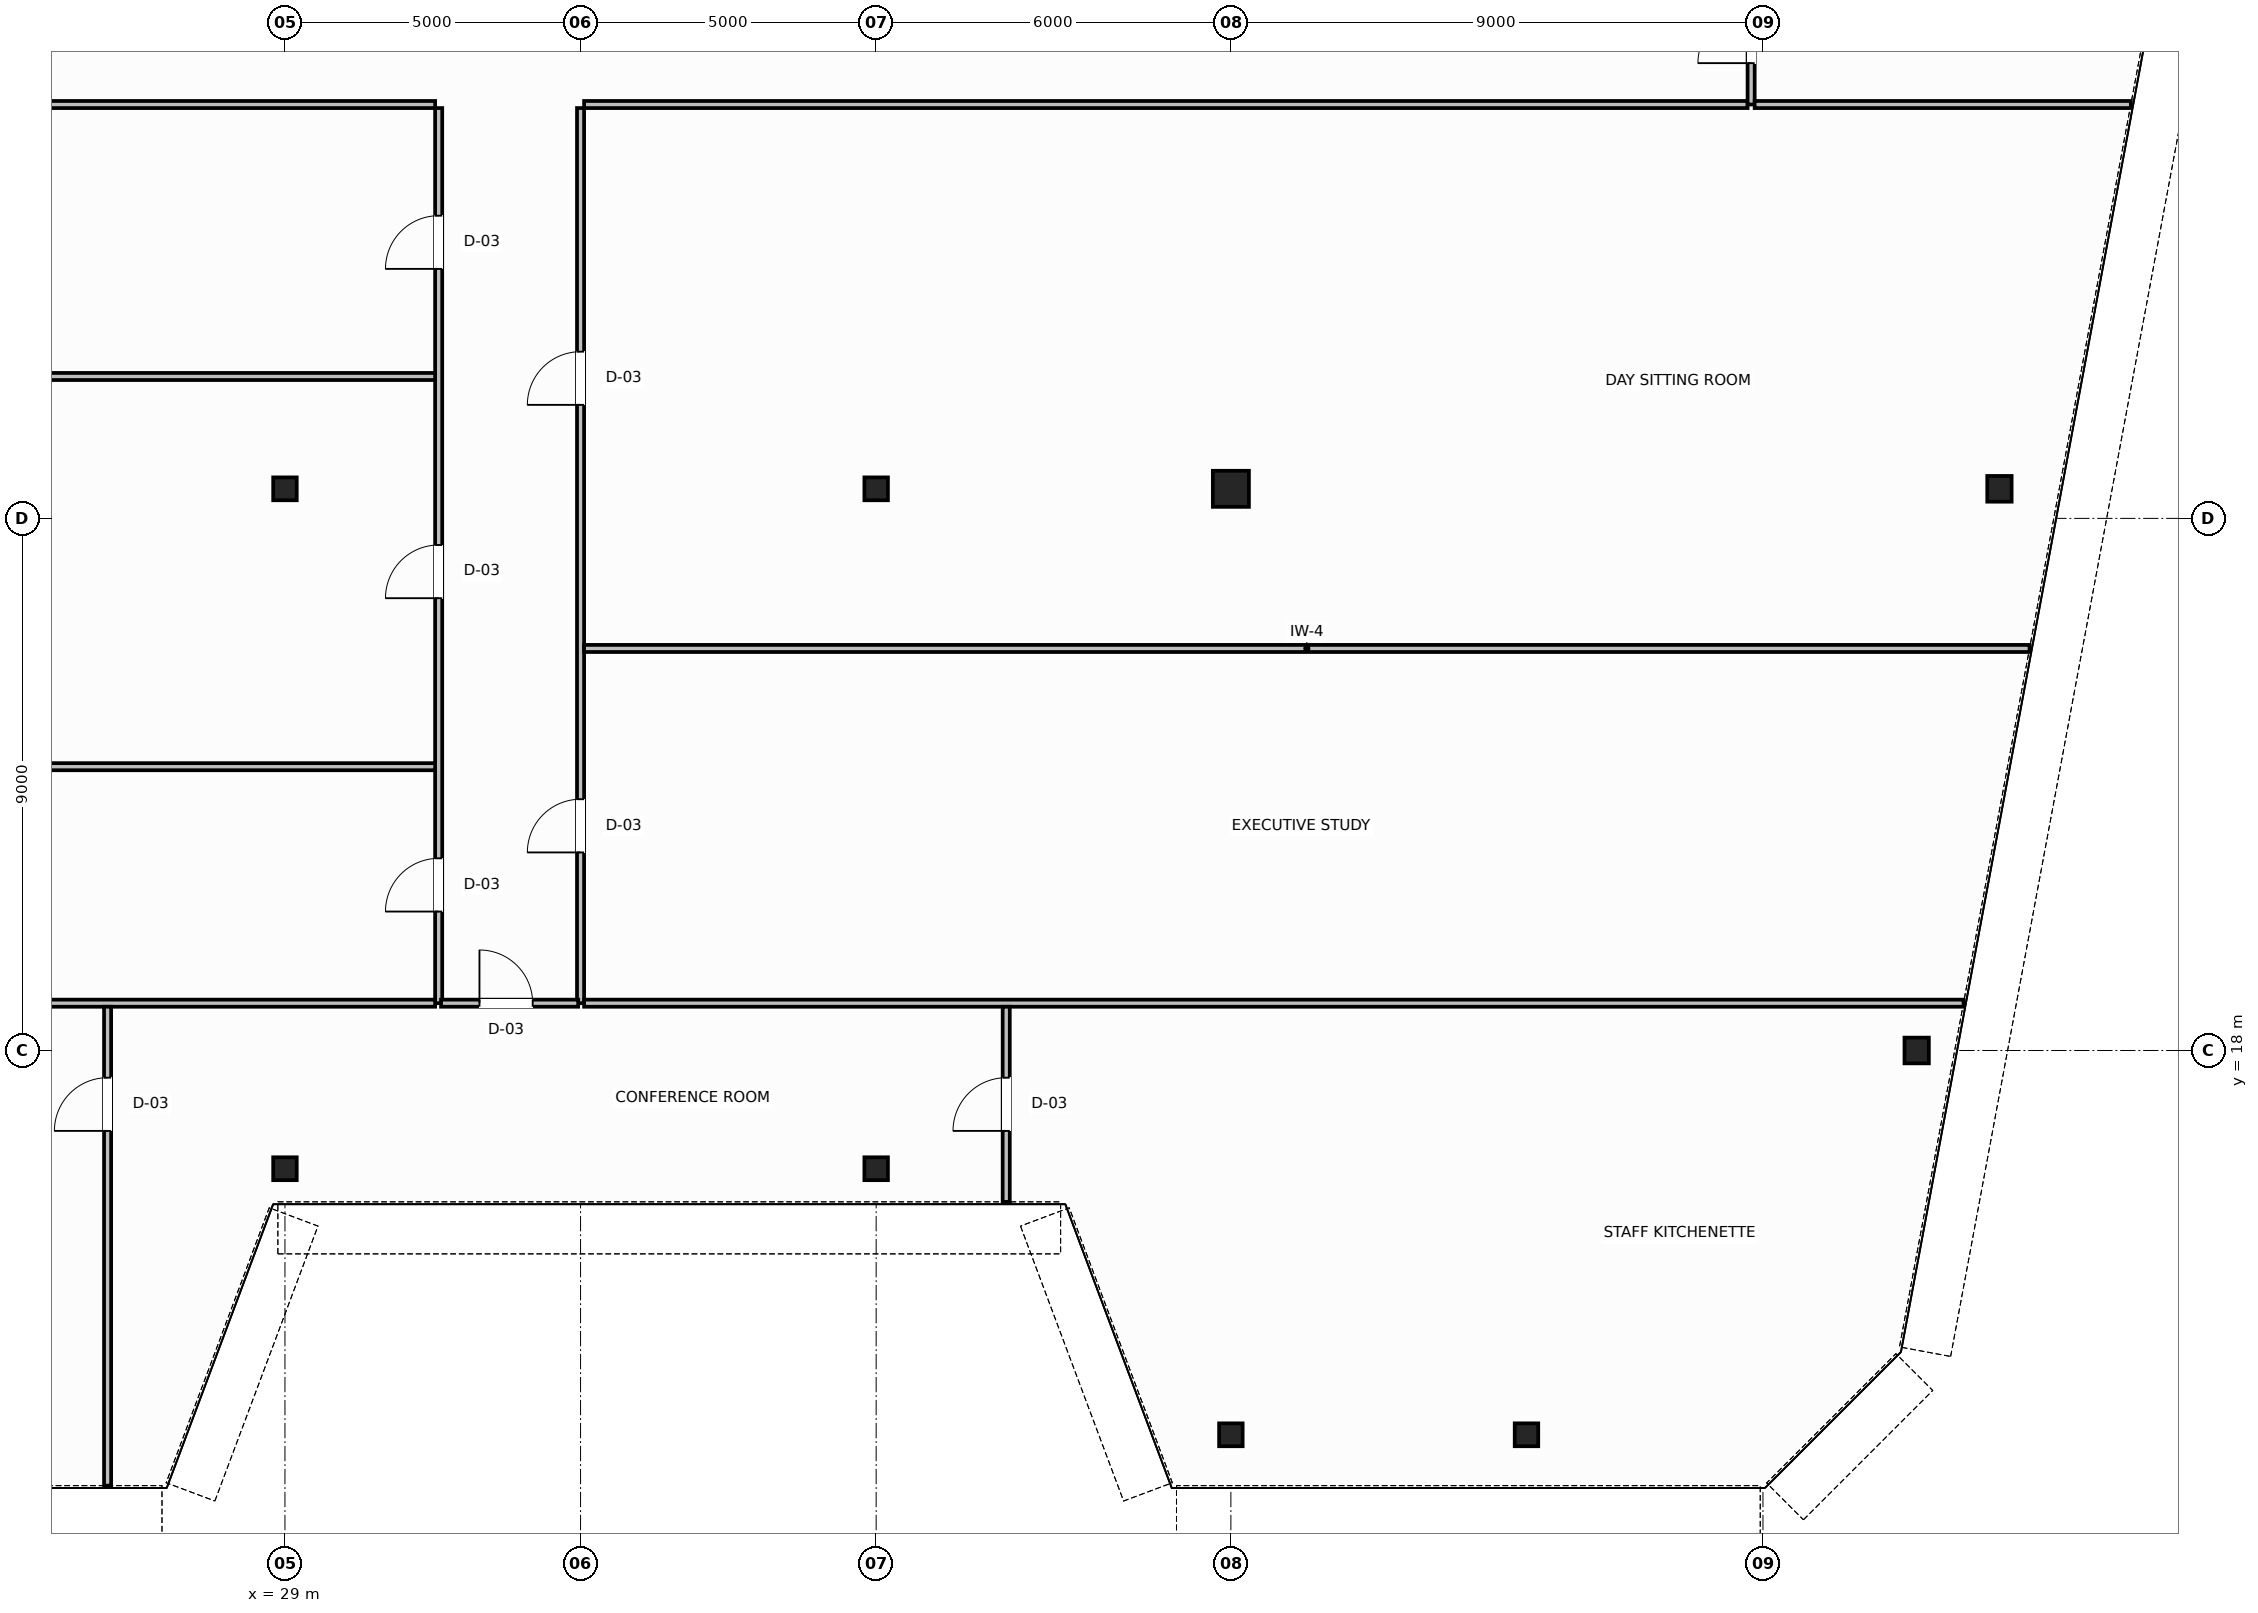
"""IFC4 building model, lengths in metres.
Left out: names, types, materials, properties, quantities, classifications, styles, units other than length and angle.
Written with IfcOpenShell. Run it as: python <this file> out.ifc"""

import sys

from ifc_helpers import new_model, si_unit, direction, frame, frame_2d, origin, origin_2d, place, context, subcontext, project, spatial, rectangle, hollow_circle, i_section, extrude, source, transform, mapped, element, fill, save


model = new_model("IFC4")
c1 = context("Model", 3, precision=1e-05, world=origin(), true_north=direction((0.0, 1.0)))
c2 = subcontext(c1, "Body", "Model", "MODEL_VIEW")
j1 = project(units=[si_unit("LENGTHUNIT", "METRE"), si_unit("PLANEANGLEUNIT", "RADIAN")], contexts=[c1])
p1 = place(None, origin())
s1 = spatial("IfcSite", under=j1, at=p1, CompositionType="ELEMENT")
p2 = place(p1, origin())
s2 = spatial("IfcBuilding", under=s1, at=p2, CompositionType="ELEMENT")
p3 = place(p2, frame((0.0, 0.0, 242.2)))
s3 = spatial("IfcBuildingStorey", under=s2, at=p3, CompositionType="ELEMENT", Elevation=242.2)
m1 = source(origin(), c2, "Body", "SweptSolid", [
    extrude(i_section(OverallWidth=0.412, OverallDepth=0.435, WebThickness=0.036, FlangeThickness=0.05, FilletRadius=0.015, at=origin_2d()), origin(), (0.0, 0.0, 1.0), 3.8),
])
for number, where, z_axis, x_axis in (
    (1, (58.0, 27.5, 0.0), (0.0, 0.0, 1.0), (1.0, 0.0, 0.0)),
    (2, (56.6, 18.0, 0.0), (0.0, 0.0, 1.0), (1.0, 0.0, 0.0)),
):
    element("IfcColumn", number, at=place(p3, frame(where, z_axis=z_axis, x_axis=x_axis)), inside=s3, PredefinedType="COLUMN", context=c2, shape_type="MappedRepresentation", body=[
        mapped(m1, transform((0.0, 0.0, 0.0), scale=1.0)),
    ])
m2 = source(origin(), c2, "Body", "SweptSolid", [
    extrude(i_section(OverallWidth=0.398, OverallDepth=0.387, WebThickness=0.021, FlangeThickness=0.029, FilletRadius=0.015, at=origin_2d()), origin(), (0.0, 0.0, 1.0), 3.8),
])
for number, where, z_axis, x_axis in (
    (3, (29.0, 27.5, 0.0), (0.0, 0.0, 1.0), (1.0, 0.0, 0.0)),
    (4, (39.0, 27.5, 0.0), (0.0, 0.0, 1.0), (1.0, 0.0, 0.0)),
):
    element("IfcColumn", number, at=place(p3, frame(where, z_axis=z_axis, x_axis=x_axis)), inside=s3, PredefinedType="COLUMN", context=c2, shape_type="MappedRepresentation", body=[
        mapped(m2, transform((0.0, 0.0, 0.0), scale=1.0)),
    ])
m3 = source(origin(), c2, "Body", "SweptSolid", [
    extrude(hollow_circle(Radius=0.305, WallThickness=0.03, at=origin_2d()), origin(), (0.0, 0.0, 1.0), 3.8),
])
p4 = place(p3, frame((45.0, 27.5, 0.0), z_axis=(0.0, 0.0, 1.0), x_axis=(1.0, 0.0, 0.0)))
e5 = element("IfcColumn", 5, at=p4, inside=s3, PredefinedType="COLUMN", context=c2, shape_type="MappedRepresentation", body=[
    mapped(m3, transform((0.0, 0.0, 0.0), scale=1.0)),
])
for number, where, z_axis, x_axis in (
    (6, (29.0, 16.0, 0.0), (0.0, 0.0, 1.0), (1.0, 0.0, 0.0)),
    (7, (39.0, 16.0, 0.0), (0.0, 0.0, 1.0), (1.0, 0.0, 0.0)),
    (8, (45.0, 11.5, 0.0), (0.0, 0.0, 1.0), (1.0, 0.0, 0.0)),
    (9, (50.0, 11.5, 0.0), (0.0, 0.0, 1.0), (1.0, 0.0, 0.0)),
):
    element("IfcColumn", number, at=place(p3, frame(where, z_axis=z_axis, x_axis=x_axis)), inside=s3, PredefinedType="COLUMN", context=c2, shape_type="MappedRepresentation", body=[
        mapped(m2, transform((0.0, 0.0, 0.0), scale=1.0)),
    ])
p5 = place(p3, frame((14.26, 34.0, 0.0), z_axis=(0.0, 0.0, 1.0), x_axis=(1.0, 0.0, 0.0)))
e10 = element("IfcWall", 10, at=p5, inside=s3, PredefinedType="PARTITIONING", context=c2, shape_type="SweptSolid", body=[
    extrude(rectangle(XDim=17.28, YDim=0.12, at=frame_2d((8.64, 0.0))), origin(), (0.0, 0.0, 1.0), 3.58),
])
p6 = place(p3, frame((34.06, 34.0, 0.0), z_axis=(0.0, 0.0, 1.0), x_axis=(1.0, 0.0, 0.0)))
e11 = element("IfcWall", 11, at=p6, inside=s3, PredefinedType="PARTITIONING", context=c2, shape_type="SweptSolid", body=[
    extrude(rectangle(XDim=19.68, YDim=0.12, at=frame_2d((9.84, 0.0))), origin(), (0.0, 0.0, 1.0), 3.58),
])
p7 = place(p3, frame((53.8, 34.0, 0.0), z_axis=(0.0, 0.0, 1.0), x_axis=(0.0, 1.0, 0.0)))
e12 = element("IfcWall", 12, at=p7, inside=s3, PredefinedType="PARTITIONING", context=c2, shape_type="SweptSolid", body=[
    extrude(rectangle(XDim=2.44, YDim=0.12, at=frame_2d((1.22, 0.0))), origin(), (0.0, 0.0, 1.0), 3.58),
])
p8 = place(p7, frame((0.7, 0.0, 0.0)))
e13 = element("IfcOpeningElement", 13, at=p8, cuts=e12, PredefinedType="OPENING", context=c2, shape_type="SweptSolid", body=[
    extrude(rectangle(XDim=0.9, YDim=2.15, at=frame_2d((0.45, 1.075))), frame((0.0, 0.07, 0.0), z_axis=(0.0, -1.0, 0.0), x_axis=(1.0, 0.0, 0.0)), (0.0, 0.0, 1.0), 0.14),
])
p9 = place(p3, frame((31.6, 18.8, 0.0), z_axis=(0.0, 0.0, 1.0), x_axis=(0.0, 1.0, 0.0)))
e14 = element("IfcWall", 14, at=p9, inside=s3, PredefinedType="PARTITIONING", context=c2, shape_type="SweptSolid", body=[
    extrude(rectangle(XDim=15.14, YDim=0.12, at=frame_2d((7.57, 0.0))), origin(), (0.0, 0.0, 1.0), 3.58),
])
p10 = place(p9, frame((1.55, 0.0, 0.0)))
e15 = element("IfcOpeningElement", 15, at=p10, cuts=e14, PredefinedType="OPENING", context=c2, shape_type="SweptSolid", body=[
    extrude(rectangle(XDim=0.9, YDim=2.15, at=frame_2d((0.45, 1.075))), frame((0.0, 0.07, 0.0), z_axis=(0.0, -1.0, 0.0), x_axis=(1.0, 0.0, 0.0)), (0.0, 0.0, 1.0), 0.14),
])
p11 = place(p9, frame((6.85, 0.0, 0.0)))
e16 = element("IfcOpeningElement", 16, at=p11, cuts=e14, PredefinedType="OPENING", context=c2, shape_type="SweptSolid", body=[
    extrude(rectangle(XDim=0.9, YDim=2.15, at=frame_2d((0.45, 1.075))), frame((0.0, 0.07, 0.0), z_axis=(0.0, -1.0, 0.0), x_axis=(1.0, 0.0, 0.0)), (0.0, 0.0, 1.0), 0.14),
])
p12 = place(p9, frame((12.42, 0.0, 0.0)))
e17 = element("IfcOpeningElement", 17, at=p12, cuts=e14, PredefinedType="OPENING", context=c2, shape_type="SweptSolid", body=[
    extrude(rectangle(XDim=0.9, YDim=2.15, at=frame_2d((0.45, 1.075))), frame((0.0, 0.07, 0.0), z_axis=(0.0, -1.0, 0.0), x_axis=(1.0, 0.0, 0.0)), (0.0, 0.0, 1.0), 0.14),
])
p13 = place(p3, frame((34.0, 18.8, 0.0), z_axis=(0.0, 0.0, 1.0), x_axis=(0.0, 1.0, 0.0)))
e18 = element("IfcWall", 18, at=p13, inside=s3, PredefinedType="PARTITIONING", context=c2, shape_type="SweptSolid", body=[
    extrude(rectangle(XDim=15.14, YDim=0.12, at=frame_2d((7.57, 0.0))), origin(), (0.0, 0.0, 1.0), 3.58),
])
p14 = place(p13, frame((2.55, 0.0, 0.0)))
e19 = element("IfcOpeningElement", 19, at=p14, cuts=e18, PredefinedType="OPENING", context=c2, shape_type="SweptSolid", body=[
    extrude(rectangle(XDim=0.9, YDim=2.15, at=frame_2d((0.45, 1.075))), frame((0.0, 0.07, 0.0), z_axis=(0.0, -1.0, 0.0), x_axis=(1.0, 0.0, 0.0)), (0.0, 0.0, 1.0), 0.14),
])
p15 = place(p13, frame((10.12, 0.0, 0.0)))
e20 = element("IfcOpeningElement", 20, at=p15, cuts=e18, PredefinedType="OPENING", context=c2, shape_type="SweptSolid", body=[
    extrude(rectangle(XDim=0.9, YDim=2.15, at=frame_2d((0.45, 1.075))), frame((0.0, 0.07, 0.0), z_axis=(0.0, -1.0, 0.0), x_axis=(1.0, 0.0, 0.0)), (0.0, 0.0, 1.0), 0.14),
])
p16 = place(p3, frame((31.64, 18.8, 0.0), z_axis=(0.0, 0.0, 1.0), x_axis=(1.0, 0.0, 0.0)))
e21 = element("IfcWall", 21, at=p16, inside=s3, PredefinedType="PARTITIONING", context=c2, shape_type="SweptSolid", body=[
    extrude(rectangle(XDim=2.32, YDim=0.12, at=frame_2d((1.16, 0.0))), origin(), (0.0, 0.0, 1.0), 3.58),
])
p17 = place(p16, frame((0.65, 0.0, 0.0)))
e22 = element("IfcOpeningElement", 22, at=p17, cuts=e21, PredefinedType="OPENING", context=c2, shape_type="SweptSolid", body=[
    extrude(rectangle(XDim=0.9, YDim=2.15, at=frame_2d((0.45, 1.075))), frame((0.0, 0.07, 0.0), z_axis=(0.0, -1.0, 0.0), x_axis=(1.0, 0.0, 0.0)), (0.0, 0.0, 1.0), 0.14),
])
p18 = place(p3, frame((53.86, 34.0, 0.0), z_axis=(0.0, 0.0, 1.0), x_axis=(1.0, 0.0, 0.0)))
e23 = element("IfcWall", 23, at=p18, inside=s3, PredefinedType="PARTITIONING", context=c2, shape_type="SweptSolid", body=[
    extrude(rectangle(XDim=6.363, YDim=0.12, at=frame_2d((3.181, 0.0))), origin(), (0.0, 0.0, 1.0), 3.58),
])
p19 = place(p3, frame((9.863, 22.8, 0.0), z_axis=(0.0, 0.0, 1.0), x_axis=(1.0, 0.0, 0.0)))
e24 = element("IfcWall", 24, at=p19, inside=s3, PredefinedType="PARTITIONING", context=c2, shape_type="SweptSolid", body=[
    extrude(rectangle(XDim=21.677, YDim=0.12, at=frame_2d((10.839, 0.0))), origin(), (0.0, 0.0, 1.0), 3.58),
])
p20 = place(p3, frame((8.634, 29.4, 0.0), z_axis=(0.0, 0.0, 1.0), x_axis=(1.0, 0.0, 0.0)))
e25 = element("IfcWall", 25, at=p20, inside=s3, PredefinedType="PARTITIONING", context=c2, shape_type="SweptSolid", body=[
    extrude(rectangle(XDim=22.906, YDim=0.12, at=frame_2d((11.453, 0.0))), origin(), (0.0, 0.0, 1.0), 3.58),
])
p21 = place(p3, frame((34.06, 24.8, 0.0), z_axis=(0.0, 0.0, 1.0), x_axis=(1.0, 0.0, 0.0)))
e26 = element("IfcWall", 26, at=p21, inside=s3, PredefinedType="PARTITIONING", context=c2, shape_type="SweptSolid", body=[
    extrude(rectangle(XDim=24.45, YDim=0.12, at=frame_2d((12.225, 0.0))), origin(), (0.0, 0.0, 1.0), 3.58),
])
p22 = place(p3, frame((10.607, 18.8, 0.0), z_axis=(0.0, 0.0, 1.0), x_axis=(1.0, 0.0, 0.0)))
e27 = element("IfcWall", 27, at=p22, inside=s3, PredefinedType="PARTITIONING", context=c2, shape_type="SweptSolid", body=[
    extrude(rectangle(XDim=20.933, YDim=0.12, at=frame_2d((10.466, 0.0))), origin(), (0.0, 0.0, 1.0), 3.58),
])
p23 = place(p3, frame((34.06, 18.8, 0.0), z_axis=(0.0, 0.0, 1.0), x_axis=(1.0, 0.0, 0.0)))
e28 = element("IfcWall", 28, at=p23, inside=s3, PredefinedType="PARTITIONING", context=c2, shape_type="SweptSolid", body=[
    extrude(rectangle(XDim=23.333, YDim=0.12, at=frame_2d((11.666, 0.0))), origin(), (0.0, 0.0, 1.0), 3.58),
])
p24 = place(p3, frame((26.0, 10.64, 0.0), z_axis=(0.0, 0.0, 1.0), x_axis=(0.0, 1.0, 0.0)))
e29 = element("IfcWall", 29, at=p24, inside=s3, PredefinedType="PARTITIONING", context=c2, shape_type="SweptSolid", body=[
    extrude(rectangle(XDim=8.1, YDim=0.12, at=frame_2d((4.05, 0.0))), origin(), (0.0, 0.0, 1.0), 3.58),
])
p25 = place(p24, frame((6.0, 0.0, 0.0)))
e30 = element("IfcOpeningElement", 30, at=p25, cuts=e29, PredefinedType="OPENING", context=c2, shape_type="SweptSolid", body=[
    extrude(rectangle(XDim=0.9, YDim=2.15, at=frame_2d((0.45, 1.075))), frame((0.0, 0.07, 0.0), z_axis=(0.0, -1.0, 0.0), x_axis=(1.0, 0.0, 0.0)), (0.0, 0.0, 1.0), 0.14),
])
p26 = place(p3, frame((41.2, 15.44, 0.0), z_axis=(0.0, 0.0, 1.0), x_axis=(0.0, 1.0, 0.0)))
e31 = element("IfcWall", 31, at=p26, inside=s3, PredefinedType="PARTITIONING", context=c2, shape_type="SweptSolid", body=[
    extrude(rectangle(XDim=3.3, YDim=0.12, at=frame_2d((1.65, 0.0))), origin(), (0.0, 0.0, 1.0), 3.58),
])
p27 = place(p26, frame((1.2, 0.0, 0.0)))
e32 = element("IfcOpeningElement", 32, at=p27, cuts=e31, PredefinedType="OPENING", context=c2, shape_type="SweptSolid", body=[
    extrude(rectangle(XDim=0.9, YDim=2.15, at=frame_2d((0.45, 1.075))), frame((0.0, 0.07, 0.0), z_axis=(0.0, -1.0, 0.0), x_axis=(1.0, 0.0, 0.0)), (0.0, 0.0, 1.0), 0.14),
])
m4 = source(origin(), c2, "Body", "SweptSolid", [
    extrude(rectangle(XDim=0.9, YDim=2.15, at=frame_2d((0.45, 1.075))), frame((0.0, 0.025, 0.0), z_axis=(0.0, -1.0, 0.0), x_axis=(1.0, 0.0, 0.0)), (0.0, 0.0, 1.0), 0.05),
])
p28 = place(p8, origin())
e33 = element("IfcDoor", 33, at=p28, inside=s3, OperationType="SINGLE_SWING_RIGHT", PredefinedType="DOOR", context=c2, shape_type="MappedRepresentation", body=[
    mapped(m4, transform((0.0, 0.0, 0.0), scale=1.0)),
])
fill(e13, e33)
p29 = place(p10, origin())
e34 = element("IfcDoor", 34, at=p29, inside=s3, OperationType="SINGLE_SWING_LEFT", PredefinedType="DOOR", context=c2, shape_type="MappedRepresentation", body=[
    mapped(m4, transform((0.0, 0.0, 0.0), scale=1.0)),
])
fill(e15, e34)
p30 = place(p11, origin())
e35 = element("IfcDoor", 35, at=p30, inside=s3, OperationType="SINGLE_SWING_RIGHT", PredefinedType="DOOR", context=c2, shape_type="MappedRepresentation", body=[
    mapped(m4, transform((0.0, 0.0, 0.0), scale=1.0)),
])
fill(e16, e35)
p31 = place(p12, origin())
e36 = element("IfcDoor", 36, at=p31, inside=s3, OperationType="SINGLE_SWING_LEFT", PredefinedType="DOOR", context=c2, shape_type="MappedRepresentation", body=[
    mapped(m4, transform((0.0, 0.0, 0.0), scale=1.0)),
])
fill(e17, e36)
p32 = place(p14, origin())
e37 = element("IfcDoor", 37, at=p32, inside=s3, OperationType="SINGLE_SWING_RIGHT", PredefinedType="DOOR", context=c2, shape_type="MappedRepresentation", body=[
    mapped(m4, transform((0.0, 0.0, 0.0), scale=1.0)),
])
fill(e19, e37)
p33 = place(p15, origin())
e38 = element("IfcDoor", 38, at=p33, inside=s3, OperationType="SINGLE_SWING_LEFT", PredefinedType="DOOR", context=c2, shape_type="MappedRepresentation", body=[
    mapped(m4, transform((0.0, 0.0, 0.0), scale=1.0)),
])
fill(e20, e38)
p34 = place(p25, origin())
e39 = element("IfcDoor", 39, at=p34, inside=s3, OperationType="SINGLE_SWING_RIGHT", PredefinedType="DOOR", context=c2, shape_type="MappedRepresentation", body=[
    mapped(m4, transform((0.0, 0.0, 0.0), scale=1.0)),
])
fill(e30, e39)
p35 = place(p17, origin())
e40 = element("IfcDoor", 40, at=p35, inside=s3, OperationType="SINGLE_SWING_LEFT", PredefinedType="DOOR", context=c2, shape_type="MappedRepresentation", body=[
    mapped(m4, transform((0.0, 0.0, 0.0), scale=1.0)),
])
fill(e22, e40)
p36 = place(p27, origin())
e41 = element("IfcDoor", 41, at=p36, inside=s3, OperationType="SINGLE_SWING_LEFT", PredefinedType="DOOR", context=c2, shape_type="MappedRepresentation", body=[
    mapped(m4, transform((0.0, 0.0, 0.0), scale=1.0)),
])
fill(e32, e41)
save(model, sys.argv[1])
